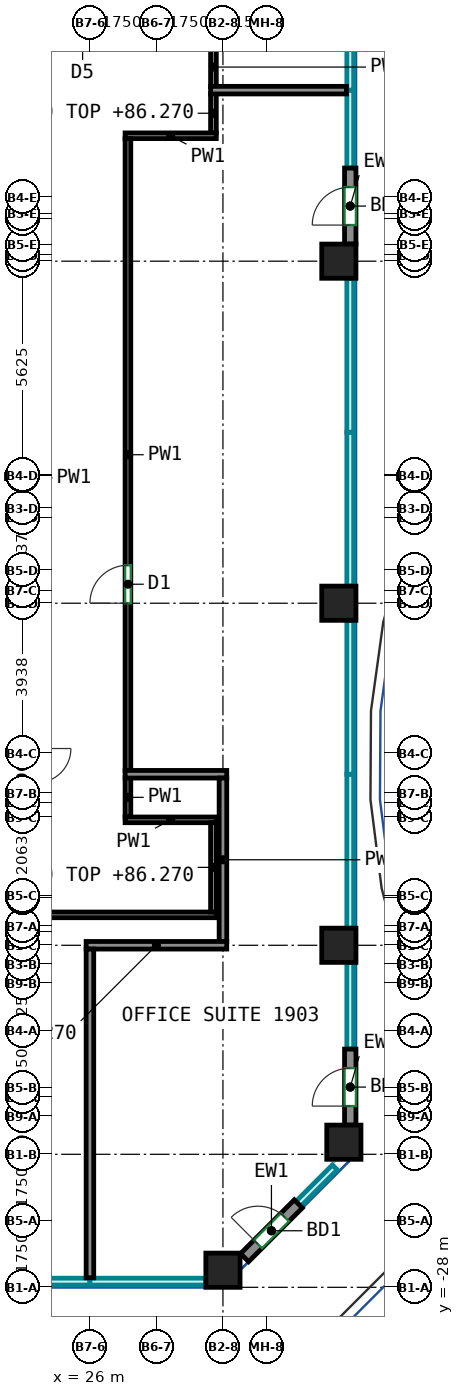
"""IFC4 building model, lengths in metres.
Left out: names, types, materials, properties, quantities, classifications, styles, units other than length and angle.
Written with IfcOpenShell. Run it as: python <this file> out.ifc"""

import sys

from ifc_helpers import new_model, si_unit, direction, frame, frame_2d, origin, origin_2d, place, context, subcontext, project, spatial, rectangle, extrude, source, transform, mapped, element, fill, save


model = new_model("IFC4")
c1 = context("Model", 3, precision=1e-05, world=origin(), true_north=direction((0.0, 1.0)))
c2 = subcontext(c1, "Body", "Model", "MODEL_VIEW")
j1 = project(units=[si_unit("LENGTHUNIT", "METRE"), si_unit("PLANEANGLEUNIT", "RADIAN")], contexts=[c1])
p1 = place(None, origin())
s1 = spatial("IfcSite", under=j1, at=p1, CompositionType="ELEMENT")
p2 = place(p1, origin())
s2 = spatial("IfcBuilding", under=s1, at=p2, CompositionType="ELEMENT")
p3 = place(p2, frame((0.0, 0.0, 83.2)))
s3 = spatial("IfcBuildingStorey", under=s2, at=p3, CompositionType="ELEMENT", Elevation=83.2)
m1 = source(origin(), c2, "Body", "SweptSolid", [
    extrude(rectangle(XDim=0.9, YDim=0.9, at=origin_2d()), origin(), (0.0, 0.0, 1.0), 3.72),
])
for number, where, z_axis, x_axis in (
    (1, (29.5, -27.55, 0.0), (0.0, 0.0, 1.0), (1.0, 0.0, 0.0)),
    (2, (32.55, -19.0, 0.0), (0.0, 0.0, 1.0), (1.0, 0.0, 0.0)),
    (3, (32.55, -10.0, 0.0), (0.0, 0.0, 1.0), (1.0, 0.0, 0.0)),
    (4, (32.55, -1.0, 0.0), (0.0, 0.0, 1.0), (1.0, 0.0, 0.0)),
    (5, (32.682, -24.182, 0.0), (0.0, 0.0, 1.0), (1.0, 0.0, 0.0)),
):
    element("IfcColumn", number, at=place(p3, frame(where, z_axis=z_axis, x_axis=x_axis)), inside=s3, PredefinedType="COLUMN", context=c2, shape_type="MappedRepresentation", body=[
        mapped(m1, transform((0.0, 0.0, 0.0))),
    ])
m2 = source(origin(), c2, "Body", "SweptSolid", [
    extrude(rectangle(XDim=2.0, YDim=0.3, at=frame_2d((1.0, 0.0))), origin(), (0.0, 0.0, 1.0), 3.72),
])
p4 = place(p3, frame((30.069, -27.219, 0.0), z_axis=(0.0, 0.0, 1.0), x_axis=(0.707106781187, 0.707106781187, 0.0)))
e6 = element("IfcWall", 6, at=p4, inside=s3, PredefinedType="SOLIDWALL", context=c2, shape_type="MappedRepresentation", body=[
    mapped(m2, transform((0.0, 0.0, 0.0))),
])
p5 = place(p4, frame((0.5, 0.0, 0.0)))
e7 = element("IfcOpeningElement", 7, at=p5, cuts=e6, PredefinedType="OPENING", context=c2, shape_type="SweptSolid", body=[
    extrude(rectangle(XDim=1.0, YDim=2.1, at=frame_2d((0.5, 1.05))), frame((0.0, 0.16, 0.0), z_axis=(0.0, -1.0, 0.0), x_axis=(1.0, 0.0, 0.0)), (0.0, 0.0, 1.0), 0.32),
])
m3 = source(origin(), c2, "Body", "SweptSolid", [
    extrude(rectangle(XDim=2.0, YDim=0.3, at=frame_2d((1.0, 0.0))), origin(), (0.0, 0.0, 1.0), 3.72),
])
p6 = place(p3, frame((32.85, -23.732, 0.0), z_axis=(0.0, 0.0, 1.0), x_axis=(0.0, 1.0, 0.0)))
e8 = element("IfcWall", 8, at=p6, inside=s3, PredefinedType="SOLIDWALL", context=c2, shape_type="MappedRepresentation", body=[
    mapped(m3, transform((0.0, 0.0, 0.0))),
])
p7 = place(p6, frame((0.5, 0.0, 0.0)))
e9 = element("IfcOpeningElement", 9, at=p7, cuts=e8, PredefinedType="OPENING", context=c2, shape_type="SweptSolid", body=[
    extrude(rectangle(XDim=1.0, YDim=2.1, at=frame_2d((0.5, 1.05))), frame((0.0, 0.16, 0.0), z_axis=(0.0, -1.0, 0.0), x_axis=(1.0, 0.0, 0.0)), (0.0, 0.0, 1.0), 0.32),
])
p8 = place(p3, frame((32.85, -0.55, 0.0), z_axis=(0.0, 0.0, 1.0), x_axis=(0.0, 1.0, 0.0)))
e10 = element("IfcWall", 10, at=p8, inside=s3, PredefinedType="SOLIDWALL", context=c2, shape_type="MappedRepresentation", body=[
    mapped(m3, transform((0.0, 0.0, 0.0))),
])
p9 = place(p8, frame((0.5, 0.0, 0.0)))
e11 = element("IfcOpeningElement", 11, at=p9, cuts=e10, PredefinedType="OPENING", context=c2, shape_type="SweptSolid", body=[
    extrude(rectangle(XDim=1.0, YDim=2.1, at=frame_2d((0.5, 1.05))), frame((0.0, 0.16, 0.0), z_axis=(0.0, -1.0, 0.0), x_axis=(1.0, 0.0, 0.0)), (0.0, 0.0, 1.0), 0.32),
])
p10 = place(p3, frame((-19.325, -18.2, 0.0), z_axis=(0.0, 0.0, 1.0), x_axis=(1.0, 0.0, 0.0)))
e12 = element("IfcWall", 12, at=p10, inside=s3, PredefinedType="PARTITIONING", context=c2, shape_type="SweptSolid", body=[
    extrude(rectangle(XDim=48.65, YDim=0.15, at=frame_2d((24.325, 0.0))), origin(), (0.0, 0.0, 1.0), 3.72),
])
p11 = place(p10, frame((12.221, 0.0, 0.0)))
e13 = element("IfcOpeningElement", 13, at=p11, cuts=e12, PredefinedType="OPENING", context=c2, shape_type="SweptSolid", body=[
    extrude(rectangle(XDim=0.9, YDim=2.1, at=frame_2d((0.45, 1.05))), frame((0.0, 0.085, 0.0), z_axis=(0.0, -1.0, 0.0), x_axis=(1.0, 0.0, 0.0)), (0.0, 0.0, 1.0), 0.17),
])
p12 = place(p10, frame((26.229, 0.0, 0.0)))
e14 = element("IfcOpeningElement", 14, at=p12, cuts=e12, PredefinedType="OPENING", context=c2, shape_type="SweptSolid", body=[
    extrude(rectangle(XDim=0.9, YDim=2.1, at=frame_2d((0.45, 1.05))), frame((0.0, 0.085, 0.0), z_axis=(0.0, -1.0, 0.0), x_axis=(1.0, 0.0, 0.0)), (0.0, 0.0, 1.0), 0.17),
])
p13 = place(p10, frame((38.029, 0.0, 0.0)))
e15 = element("IfcOpeningElement", 15, at=p13, cuts=e12, PredefinedType="OPENING", context=c2, shape_type="SweptSolid", body=[
    extrude(rectangle(XDim=0.9, YDim=2.1, at=frame_2d((0.45, 1.05))), frame((0.0, 0.085, 0.0), z_axis=(0.0, -1.0, 0.0), x_axis=(1.0, 0.0, 0.0)), (0.0, 0.0, 1.0), 0.17),
])
p14 = place(p3, frame((27.0, -15.625, 0.0), z_axis=(0.0, 0.0, 1.0), x_axis=(0.0, 1.0, 0.0)))
e16 = element("IfcWall", 16, at=p14, inside=s3, PredefinedType="PARTITIONING", context=c2, shape_type="SweptSolid", body=[
    extrude(rectangle(XDim=1.035, YDim=0.15, at=frame_2d((0.518, 0.0))), origin(), (0.0, 0.0, 1.0), 3.72),
])
p15 = place(p3, frame((26.925, -15.7, 0.0), z_axis=(0.0, 0.0, 1.0), x_axis=(1.0, 0.0, 0.0)))
e17 = element("IfcWall", 17, at=p15, inside=s3, PredefinedType="PARTITIONING", context=c2, shape_type="SweptSolid", body=[
    extrude(rectangle(XDim=2.4, YDim=0.15, at=frame_2d((1.2, 0.0))), origin(), (0.0, 0.0, 1.0), 3.72),
])
p16 = place(p3, frame((29.25, -18.125, 0.0), z_axis=(0.0, 0.0, 1.0), x_axis=(0.0, 1.0, 0.0)))
e18 = element("IfcWall", 18, at=p16, inside=s3, PredefinedType="PARTITIONING", context=c2, shape_type="SweptSolid", body=[
    extrude(rectangle(XDim=2.35, YDim=0.15, at=frame_2d((1.175, 0.0))), origin(), (0.0, 0.0, 1.0), 3.07),
])
for number, where, z_axis, x_axis in (
    (19, (29.25, 3.59, 0.0), (0.0, 0.0, 1.0), (0.0, 1.0, 0.0)),
    (20, (29.25, 2.375, 0.0), (0.0, 0.0, 1.0), (0.0, 1.0, 0.0)),
):
    element("IfcWall", number, at=place(p3, frame(where, z_axis=z_axis, x_axis=x_axis)), inside=s3, PredefinedType="PARTITIONING", context=c2, shape_type="SweptSolid", body=[
        extrude(rectangle(XDim=1.035, YDim=0.15, at=frame_2d((0.518, 0.0))), origin(), (0.0, 0.0, 1.0), 3.07),
    ])
p17 = place(p3, frame((26.925, 2.3, 0.0), z_axis=(0.0, 0.0, 1.0), x_axis=(1.0, 0.0, 0.0)))
e21 = element("IfcWall", 21, at=p17, inside=s3, PredefinedType="PARTITIONING", context=c2, shape_type="SweptSolid", body=[
    extrude(rectangle(XDim=2.4, YDim=0.15, at=frame_2d((1.2, 0.0))), origin(), (0.0, 0.0, 1.0), 3.72),
])
p18 = place(p3, frame((27.0, -14.41, 0.0), z_axis=(0.0, 0.0, 1.0), x_axis=(0.0, 1.0, 0.0)))
e22 = element("IfcWall", 22, at=p18, inside=s3, PredefinedType="PARTITIONING", context=c2, shape_type="SweptSolid", body=[
    extrude(rectangle(XDim=16.635, YDim=0.15, at=frame_2d((8.317, 0.0))), origin(), (0.0, 0.0, 1.0), 3.72),
])
p19 = place(p18, frame((4.41, 0.0, 0.0)))
e23 = element("IfcOpeningElement", 23, at=p19, cuts=e22, PredefinedType="OPENING", context=c2, shape_type="SweptSolid", body=[
    extrude(rectangle(XDim=1.0, YDim=2.1, at=frame_2d((0.5, 1.05))), frame((0.0, 0.085, 0.0), z_axis=(0.0, -1.0, 0.0), x_axis=(1.0, 0.0, 0.0)), (0.0, 0.0, 1.0), 0.17),
])
p20 = place(p3, frame((26.926, -14.5, 0.0), z_axis=(0.0, 0.0, 1.0), x_axis=(1.0, 0.0, 0.0)))
e24 = element("IfcWall", 24, at=p20, inside=s3, PredefinedType="PARTITIONING", context=c2, shape_type="SweptSolid", body=[
    extrude(rectangle(XDim=2.674, YDim=0.2, at=frame_2d((1.337, 0.0))), origin(), (0.0, 0.0, 1.0), 3.72),
])
p21 = place(p3, frame((29.5, -18.9, 0.0), z_axis=(0.0, 0.0, 1.0), x_axis=(0.0, 1.0, 0.0)))
e25 = element("IfcWall", 25, at=p21, inside=s3, PredefinedType="PARTITIONING", context=c2, shape_type="SweptSolid", body=[
    extrude(rectangle(XDim=4.3, YDim=0.2, at=frame_2d((2.15, 0.0))), origin(), (0.0, 0.0, 1.0), 3.07),
])
p22 = place(p3, frame((25.9, -19.0, 0.0), z_axis=(0.0, 0.0, 1.0), x_axis=(1.0, 0.0, 0.0)))
e26 = element("IfcWall", 26, at=p22, inside=s3, PredefinedType="PARTITIONING", context=c2, shape_type="SweptSolid", body=[
    extrude(rectangle(XDim=3.7, YDim=0.2, at=frame_2d((1.85, 0.0))), origin(), (0.0, 0.0, 1.0), 3.07),
])
p23 = place(p3, frame((26.0, -27.75, 0.0), z_axis=(0.0, 0.0, 1.0), x_axis=(0.0, 1.0, 0.0)))
e27 = element("IfcWall", 27, at=p23, inside=s3, PredefinedType="PARTITIONING", context=c2, shape_type="SweptSolid", body=[
    extrude(rectangle(XDim=8.65, YDim=0.2, at=frame_2d((4.325, 0.0))), origin(), (0.0, 0.0, 1.0), 3.72),
])
p24 = place(p3, frame((29.176, 3.5, 0.0), z_axis=(0.0, 0.0, 1.0), x_axis=(1.0, 0.0, 0.0)))
e28 = element("IfcWall", 28, at=p24, inside=s3, PredefinedType="PARTITIONING", context=c2, shape_type="SweptSolid", body=[
    extrude(rectangle(XDim=3.574, YDim=0.2, at=frame_2d((1.787, 0.0))), origin(), (0.0, 0.0, 1.0), 3.72),
])
p25 = place(p5, origin())
e29 = element("IfcDoor", 29, at=p25, inside=s3, OperationType="SINGLE_SWING_LEFT", PredefinedType="DOOR", context=c2, shape_type="SweptSolid", body=[
    extrude(rectangle(XDim=1.0, YDim=2.1, at=frame_2d((0.5, 1.05))), frame((0.0, 0.025, 0.0), z_axis=(0.0, -1.0, 0.0), x_axis=(1.0, 0.0, 0.0)), (0.0, 0.0, 1.0), 0.05),
])
fill(e7, e29)
p26 = place(p7, origin())
e30 = element("IfcDoor", 30, at=p26, inside=s3, OperationType="SINGLE_SWING_LEFT", PredefinedType="DOOR", context=c2, shape_type="SweptSolid", body=[
    extrude(rectangle(XDim=1.0, YDim=2.1, at=frame_2d((0.5, 1.05))), frame((0.0, 0.025, 0.0), z_axis=(0.0, -1.0, 0.0), x_axis=(1.0, 0.0, 0.0)), (0.0, 0.0, 1.0), 0.05),
])
fill(e9, e30)
p27 = place(p9, origin())
e31 = element("IfcDoor", 31, at=p27, inside=s3, OperationType="SINGLE_SWING_LEFT", PredefinedType="DOOR", context=c2, shape_type="SweptSolid", body=[
    extrude(rectangle(XDim=1.0, YDim=2.1, at=frame_2d((0.5, 1.05))), frame((0.0, 0.025, 0.0), z_axis=(0.0, -1.0, 0.0), x_axis=(1.0, 0.0, 0.0)), (0.0, 0.0, 1.0), 0.05),
])
fill(e11, e31)
p28 = place(p19, origin())
e32 = element("IfcDoor", 32, at=p28, inside=s3, OperationType="SINGLE_SWING_LEFT", PredefinedType="DOOR", context=c2, shape_type="SweptSolid", body=[
    extrude(rectangle(XDim=1.0, YDim=2.1, at=frame_2d((0.5, 1.05))), frame((0.0, 0.025, 0.0), z_axis=(0.0, -1.0, 0.0), x_axis=(1.0, 0.0, 0.0)), (0.0, 0.0, 1.0), 0.05),
])
fill(e23, e32)
save(model, sys.argv[1])
